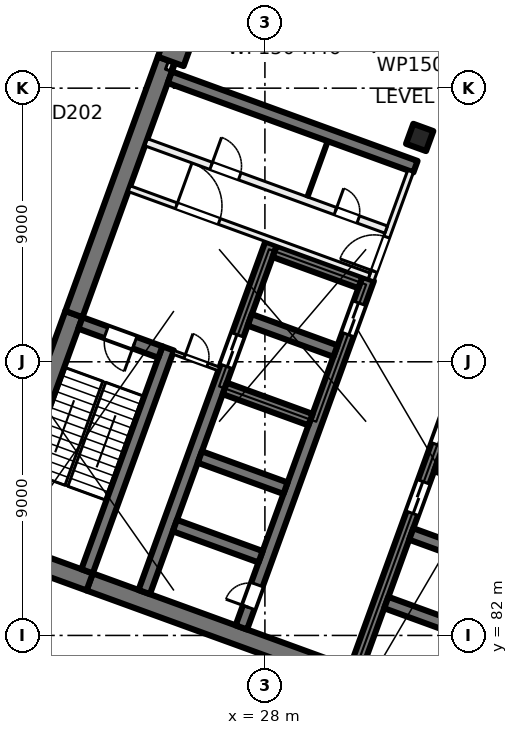
"""IFC4 building model, lengths in metres.
Left out: names, types, materials, properties, quantities, classifications, styles, units other than length and angle.
Written with IfcOpenShell. Run it as: python <this file> out.ifc"""

import sys

from ifc_helpers import new_model, si_unit, direction, frame, frame_2d, origin, origin_2d, place, context, subcontext, project, spatial, rectangle, extrude, element, fill, save


model = new_model("IFC4")
c1 = context("Model", 3, precision=1e-05, world=origin(), true_north=direction((0.0, 1.0)))
c2 = subcontext(c1, "Body", "Model", "MODEL_VIEW")
j1 = project(units=[si_unit("LENGTHUNIT", "METRE"), si_unit("PLANEANGLEUNIT", "RADIAN")], contexts=[c1])
p1 = place(None, origin())
s1 = spatial("IfcSite", under=j1, at=p1, CompositionType="ELEMENT")
p2 = place(p1, origin())
s2 = spatial("IfcBuilding", under=s1, at=p2, CompositionType="ELEMENT")
p3 = place(p2, frame((0.0, 0.0, 7.5)))
s3 = spatial("IfcBuildingStorey", under=s2, at=p3, CompositionType="ELEMENT", Elevation=7.5)
p4 = place(p3, frame((33.091, 98.379, 0.0), z_axis=(0.0, 0.0, 1.0), x_axis=(-0.342020143326, -0.939692620786, 0.0)))
e1 = element("IfcColumn", 1, at=p4, inside=s3, PredefinedType="COLUMN", context=c2, shape_type="SweptSolid", body=[
    extrude(rectangle(XDim=0.7, YDim=0.7, at=origin_2d()), origin(), (0.0, 0.0, 1.0), 5.0),
])
p5 = place(p3, frame((25.056, 101.303, 0.0), z_axis=(0.0, 0.0, 1.0), x_axis=(-0.342020143326, -0.939692620786, 0.0)))
e2 = element("IfcColumn", 2, at=p5, inside=s3, PredefinedType="COLUMN", context=c2, shape_type="SweptSolid", body=[
    extrude(rectangle(XDim=0.9, YDim=0.9, at=origin_2d()), origin(), (0.0, 0.0, 1.0), 5.0),
])
p6 = place(p3, frame((35.767, 78.835, 0.0), z_axis=(0.0, 0.0, 1.0), x_axis=(-0.939692894512, 0.342019391267, 0.0)))
e3 = element("IfcWall", 3, at=p6, inside=s3, PredefinedType="SHEAR", context=c2, shape_type="SweptSolid", body=[
    extrude(rectangle(XDim=14.4, YDim=0.6, at=frame_2d((7.2, 0.0))), origin(), (0.0, 0.0, 1.0), 5.0),
])
p7 = place(p3, frame((22.236, 83.76, 0.0), z_axis=(0.0, 0.0, 1.0), x_axis=(-0.939680822529, 0.342052557032, 0.0)))
e4 = element("IfcWall", 4, at=p7, inside=s3, PredefinedType="SHEAR", context=c2, shape_type="SweptSolid", body=[
    extrude(rectangle(XDim=3.8, YDim=0.6, at=frame_2d((1.9, 0.0))), origin(), (0.0, 0.0, 1.0), 5.0),
])
p8 = place(p3, frame((19.05, 85.239, 0.0), z_axis=(0.0, 0.0, 1.0), x_axis=(0.342016982193, 0.939693771338, 0.0)))
e5 = element("IfcWall", 5, at=p8, inside=s3, PredefinedType="SHEAR", context=c2, shape_type="SweptSolid", body=[
    extrude(rectangle(XDim=7.8, YDim=0.6, at=frame_2d((3.9, 0.0))), origin(), (0.0, 0.0, 1.0), 5.0),
])
p9 = place(p3, frame((21.717, 92.568, 0.0), z_axis=(0.0, 0.0, 1.0), x_axis=(0.342016162452, 0.939694069696, 0.0)))
e6 = element("IfcWall", 6, at=p9, inside=s3, PredefinedType="SHEAR", context=c2, shape_type="SweptSolid", body=[
    extrude(rectangle(XDim=8.9, YDim=0.6, at=frame_2d((4.45, 0.0))), origin(), (0.0, 0.0, 1.0), 5.0),
])
p10 = place(p3, frame((22.15, 84.11, 0.0), z_axis=(0.0, 0.0, 1.0), x_axis=(0.342016982193, 0.939693771338, 0.0)))
e7 = element("IfcWall", 7, at=p10, inside=s3, PredefinedType="SHEAR", context=c2, shape_type="SweptSolid", body=[
    extrude(rectangle(XDim=7.8, YDim=0.4, at=frame_2d((3.9, 0.0))), origin(), (0.0, 0.0, 1.0), 5.0),
])
p11 = place(p3, frame((24.562, 91.32, 0.0), z_axis=(0.0, 0.0, 1.0), x_axis=(-0.939717030584, 0.341953070509, 0.0)))
e8 = element("IfcWall", 8, at=p11, inside=s3, PredefinedType="SHEAR", context=c2, shape_type="SweptSolid", body=[
    extrude(rectangle(XDim=2.8, YDim=0.4, at=frame_2d((1.4, 0.0))), origin(), (0.0, 0.0, 1.0), 5.0),
])
p12 = place(p11, frame((0.9, 0.0, 0.0)))
e9 = element("IfcOpeningElement", 9, at=p12, cuts=e8, PredefinedType="OPENING", context=c2, shape_type="SweptSolid", body=[
    extrude(rectangle(XDim=1.0, YDim=2.1, at=frame_2d((0.5, 1.05))), frame((0.0, 0.21, 0.0), z_axis=(0.0, -1.0, 0.0), x_axis=(1.0, 0.0, 0.0)), (0.0, 0.0, 1.0), 0.42),
])
p13 = place(p3, frame((30.984, 80.895, 0.0), z_axis=(0.0, 0.0, 1.0), x_axis=(0.342021021735, 0.939692301071, 0.0)))
e10 = element("IfcWall", 10, at=p13, inside=s3, PredefinedType="SHEAR", context=c2, shape_type="SweptSolid", body=[
    extrude(rectangle(XDim=12.2, YDim=0.4, at=frame_2d((6.1, 0.0))), origin(), (0.0, 0.0, 1.0), 5.0),
])
p14 = place(p13, frame((5.45, 0.0, 0.0)))
e11 = element("IfcOpeningElement", 11, at=p14, cuts=e10, PredefinedType="OPENING", context=c2, shape_type="SweptSolid", body=[
    extrude(rectangle(XDim=1.1, YDim=2.1, at=frame_2d((0.55, 1.05))), frame((0.0, 0.21, 0.0), z_axis=(0.0, -1.0, 0.0), x_axis=(1.0, 0.0, 0.0)), (0.0, 0.0, 1.0), 0.42),
])
p15 = place(p13, frame((7.85, 0.0, 0.0)))
e12 = element("IfcOpeningElement", 12, at=p15, cuts=e10, PredefinedType="OPENING", context=c2, shape_type="SweptSolid", body=[
    extrude(rectangle(XDim=1.1, YDim=2.1, at=frame_2d((0.55, 1.05))), frame((0.0, 0.21, 0.0), z_axis=(0.0, -1.0, 0.0), x_axis=(1.0, 0.0, 0.0)), (0.0, 0.0, 1.0), 0.42),
])
p16 = place(p13, frame((10.25, 0.0, 0.0)))
e13 = element("IfcOpeningElement", 13, at=p16, cuts=e10, PredefinedType="OPENING", context=c2, shape_type="SweptSolid", body=[
    extrude(rectangle(XDim=1.1, YDim=2.1, at=frame_2d((0.55, 1.05))), frame((0.0, 0.21, 0.0), z_axis=(0.0, -1.0, 0.0), x_axis=(1.0, 0.0, 0.0)), (0.0, 0.0, 1.0), 0.42),
])
for number, where, z_axis, x_axis in (
    (14, (34.812, 82.056, 0.0), (0.0, 0.0, 1.0), (-0.94, 0.342, 0.0)),
    (15, (35.632, 84.311, 0.0), (0.0, 0.0, 1.0), (-0.94, 0.342, 0.0)),
    (16, (36.453, 86.566, 0.0), (0.0, 0.0, 1.0), (-0.94, 0.342, 0.0)),
):
    element("IfcWall", number, at=place(p3, frame(where, z_axis=z_axis, x_axis=x_axis)), inside=s3, PredefinedType="SHEAR", context=c2, shape_type="SweptSolid", body=[
        extrude(rectangle(XDim=3.0, YDim=0.4, at=frame_2d((1.5, 0.0))), origin(), (0.0, 0.0, 1.0), 5.0),
    ])
p17 = place(p3, frame((27.225, 82.263, 0.0), z_axis=(0.0, 0.0, 1.0), x_axis=(0.342014590177, 0.939694641948, 0.0)))
e17 = element("IfcWall", 17, at=p17, inside=s3, PredefinedType="SHEAR", context=c2, shape_type="SweptSolid", body=[
    extrude(rectangle(XDim=12.2, YDim=0.4, at=frame_2d((6.1, 0.0))), origin(), (0.0, 0.0, 1.0), 5.0),
])
p18 = place(p17, frame((10.25, 0.0, 0.0)))
e18 = element("IfcOpeningElement", 18, at=p18, cuts=e17, PredefinedType="OPENING", context=c2, shape_type="SweptSolid", body=[
    extrude(rectangle(XDim=1.1, YDim=2.1, at=frame_2d((0.55, 1.05))), frame((0.0, 0.21, 0.0), z_axis=(0.0, -1.0, 0.0), x_axis=(1.0, 0.0, 0.0)), (0.0, 0.0, 1.0), 0.42),
])
p19 = place(p17, frame((0.7, 0.0, 0.0)))
e19 = element("IfcOpeningElement", 19, at=p19, cuts=e17, PredefinedType="OPENING", context=c2, shape_type="SweptSolid", body=[
    extrude(rectangle(XDim=0.8, YDim=2.1, at=frame_2d((0.4, 1.05))), frame((0.0, 0.21, 0.0), z_axis=(0.0, -1.0, 0.0), x_axis=(1.0, 0.0, 0.0)), (0.0, 0.0, 1.0), 0.42),
])
p20 = place(p3, frame((24.03, 83.426, 0.0), z_axis=(0.0, 0.0, 1.0), x_axis=(0.342014590177, 0.939694641948, 0.0)))
e20 = element("IfcWall", 20, at=p20, inside=s3, PredefinedType="SHEAR", context=c2, shape_type="SweptSolid", body=[
    extrude(rectangle(XDim=12.2, YDim=0.4, at=frame_2d((6.1, 0.0))), origin(), (0.0, 0.0, 1.0), 5.0),
])
p21 = place(p20, frame((7.9, 0.0, 0.0)))
e21 = element("IfcOpeningElement", 21, at=p21, cuts=e20, PredefinedType="OPENING", context=c2, shape_type="SweptSolid", body=[
    extrude(rectangle(XDim=1.1, YDim=2.1, at=frame_2d((0.55, 1.05))), frame((0.0, 0.21, 0.0), z_axis=(0.0, -1.0, 0.0), x_axis=(1.0, 0.0, 0.0)), (0.0, 0.0, 1.0), 0.42),
])
p22 = place(p3, frame((27.858, 84.587, 0.0), z_axis=(0.0, 0.0, 1.0), x_axis=(-0.939686455819, 0.342037080957, 0.0)))
e22 = element("IfcWall", 22, at=p22, inside=s3, PredefinedType="SHEAR", context=c2, shape_type="SweptSolid", body=[
    extrude(rectangle(XDim=3.0, YDim=0.4, at=frame_2d((1.5, 0.0))), origin(), (0.0, 0.0, 1.0), 5.0),
])
p23 = place(p3, frame((28.678, 86.842, 0.0), z_axis=(0.0, 0.0, 1.0), x_axis=(-0.939676934218, 0.342063238742, 0.0)))
e23 = element("IfcWall", 23, at=p23, inside=s3, PredefinedType="SHEAR", context=c2, shape_type="SweptSolid", body=[
    extrude(rectangle(XDim=3.0, YDim=0.4, at=frame_2d((1.5, 0.0))), origin(), (0.0, 0.0, 1.0), 5.0),
])
for number, where, z_axis, x_axis in (
    (24, (29.5, 89.097, 0.0), (0.0, 0.0, 1.0), (-0.94, 0.342, 0.0)),
    (25, (30.32, 91.353, 0.0), (0.0, 0.0, 1.0), (-0.94, 0.342, 0.0)),
    (26, (31.141, 93.608, 0.0), (0.0, 0.0, 1.0), (-0.94, 0.342, 0.0)),
):
    element("IfcWall", number, at=place(p3, frame(where, z_axis=z_axis, x_axis=x_axis)), inside=s3, PredefinedType="SHEAR", context=c2, shape_type="SweptSolid", body=[
        extrude(rectangle(XDim=3.0, YDim=0.4, at=frame_2d((1.5, 0.0))), origin(), (0.0, 0.0, 1.0), 5.0),
    ])
p24 = place(p3, frame((32.953, 97.418, 0.0), z_axis=(0.0, 0.0, 1.0), x_axis=(-0.93969060187, 0.342025690201, 0.0)))
e27 = element("IfcWall", 27, at=p24, inside=s3, PredefinedType="SHEAR", context=c2, shape_type="SweptSolid", body=[
    extrude(rectangle(XDim=8.6, YDim=0.4, at=frame_2d((4.3, 0.0))), origin(), (0.0, 0.0, 1.0), 5.0),
])
p25 = place(p3, frame((12.199, 89.809, 0.0), z_axis=(0.0, 0.0, 1.0), x_axis=(0.342022998908, 0.939691581434, 0.0)))
e28 = element("IfcWall", 28, at=p25, inside=s3, PredefinedType="SOLIDWALL", context=c2, shape_type="SweptSolid", body=[
    extrude(rectangle(XDim=47.334, YDim=0.6, at=frame_2d((23.667, 0.0))), origin(), (0.0, 0.0, 1.0), 4.6),
])
p26 = place(p25, frame((0.773, 0.0, 0.9)))
e29 = element("IfcOpeningElement", 29, at=p26, cuts=e28, PredefinedType="OPENING", context=c2, shape_type="SweptSolid", body=[
    extrude(rectangle(XDim=3.0, YDim=3.0, at=frame_2d((1.5, 1.5))), frame((0.0, 0.31, 0.0), z_axis=(0.0, -1.0, 0.0), x_axis=(1.0, 0.0, 0.0)), (0.0, 0.0, 1.0), 0.62),
])
p27 = place(p25, frame((5.379, 0.0, 0.9)))
e30 = element("IfcOpeningElement", 30, at=p27, cuts=e28, PredefinedType="OPENING", context=c2, shape_type="SweptSolid", body=[
    extrude(rectangle(XDim=3.0, YDim=3.0, at=frame_2d((1.5, 1.5))), frame((0.0, 0.31, 0.0), z_axis=(0.0, -1.0, 0.0), x_axis=(1.0, 0.0, 0.0)), (0.0, 0.0, 1.0), 0.62),
])
p28 = place(p25, frame((9.235, 0.0, 0.9)))
e31 = element("IfcOpeningElement", 31, at=p28, cuts=e28, PredefinedType="OPENING", context=c2, shape_type="SweptSolid", body=[
    extrude(rectangle(XDim=3.0, YDim=3.0, at=frame_2d((1.5, 1.5))), frame((0.0, 0.31, 0.0), z_axis=(0.0, -1.0, 0.0), x_axis=(1.0, 0.0, 0.0)), (0.0, 0.0, 1.0), 0.62),
])
p29 = place(p25, frame((14.786, 0.0, 0.9)))
e32 = element("IfcOpeningElement", 32, at=p29, cuts=e28, PredefinedType="OPENING", context=c2, shape_type="SweptSolid", body=[
    extrude(rectangle(XDim=1.2, YDim=3.0, at=frame_2d((0.6, 1.5))), frame((0.0, 0.31, 0.0), z_axis=(0.0, -1.0, 0.0), x_axis=(1.0, 0.0, 0.0)), (0.0, 0.0, 1.0), 0.62),
])
p30 = place(p25, frame((16.286, 0.0, 0.9)))
e33 = element("IfcOpeningElement", 33, at=p30, cuts=e28, PredefinedType="OPENING", context=c2, shape_type="SweptSolid", body=[
    extrude(rectangle(XDim=1.2, YDim=3.0, at=frame_2d((0.6, 1.5))), frame((0.0, 0.31, 0.0), z_axis=(0.0, -1.0, 0.0), x_axis=(1.0, 0.0, 0.0)), (0.0, 0.0, 1.0), 0.62),
])
p31 = place(p25, frame((18.118, 0.0, 0.9)))
e34 = element("IfcOpeningElement", 34, at=p31, cuts=e28, PredefinedType="OPENING", context=c2, shape_type="SweptSolid", body=[
    extrude(rectangle(XDim=1.2, YDim=3.0, at=frame_2d((0.6, 1.5))), frame((0.0, 0.31, 0.0), z_axis=(0.0, -1.0, 0.0), x_axis=(1.0, 0.0, 0.0)), (0.0, 0.0, 1.0), 0.62),
])
p32 = place(p25, frame((19.618, 0.0, 0.9)))
e35 = element("IfcOpeningElement", 35, at=p32, cuts=e28, PredefinedType="OPENING", context=c2, shape_type="SweptSolid", body=[
    extrude(rectangle(XDim=1.2, YDim=3.0, at=frame_2d((0.6, 1.5))), frame((0.0, 0.31, 0.0), z_axis=(0.0, -1.0, 0.0), x_axis=(1.0, 0.0, 0.0)), (0.0, 0.0, 1.0), 0.62),
])
p33 = place(p25, frame((22.452, 0.0, 0.9)))
e36 = element("IfcOpeningElement", 36, at=p33, cuts=e28, PredefinedType="OPENING", context=c2, shape_type="SweptSolid", body=[
    extrude(rectangle(XDim=3.0, YDim=3.0, at=frame_2d((1.5, 1.5))), frame((0.0, 0.31, 0.0), z_axis=(0.0, -1.0, 0.0), x_axis=(1.0, 0.0, 0.0)), (0.0, 0.0, 1.0), 0.62),
])
p34 = place(p25, frame((26.458, 0.0, 0.9)))
e37 = element("IfcOpeningElement", 37, at=p34, cuts=e28, PredefinedType="OPENING", context=c2, shape_type="SweptSolid", body=[
    extrude(rectangle(XDim=3.0, YDim=3.0, at=frame_2d((1.5, 1.5))), frame((0.0, 0.31, 0.0), z_axis=(0.0, -1.0, 0.0), x_axis=(1.0, 0.0, 0.0)), (0.0, 0.0, 1.0), 0.62),
])
p35 = place(p25, frame((31.064, 0.0, 0.9)))
e38 = element("IfcOpeningElement", 38, at=p35, cuts=e28, PredefinedType="OPENING", context=c2, shape_type="SweptSolid", body=[
    extrude(rectangle(XDim=3.0, YDim=3.0, at=frame_2d((1.5, 1.5))), frame((0.0, 0.31, 0.0), z_axis=(0.0, -1.0, 0.0), x_axis=(1.0, 0.0, 0.0)), (0.0, 0.0, 1.0), 0.62),
])
p36 = place(p25, frame((36.029, 0.0, 0.9)))
e39 = element("IfcOpeningElement", 39, at=p36, cuts=e28, PredefinedType="OPENING", context=c2, shape_type="SweptSolid", body=[
    extrude(rectangle(XDim=1.2, YDim=3.0, at=frame_2d((0.6, 1.5))), frame((0.0, 0.31, 0.0), z_axis=(0.0, -1.0, 0.0), x_axis=(1.0, 0.0, 0.0)), (0.0, 0.0, 1.0), 0.62),
])
p37 = place(p25, frame((39.676, 0.0, 0.9)))
e40 = element("IfcOpeningElement", 40, at=p37, cuts=e28, PredefinedType="OPENING", context=c2, shape_type="SweptSolid", body=[
    extrude(rectangle(XDim=3.0, YDim=3.0, at=frame_2d((1.5, 1.5))), frame((0.0, 0.31, 0.0), z_axis=(0.0, -1.0, 0.0), x_axis=(1.0, 0.0, 0.0)), (0.0, 0.0, 1.0), 0.62),
])
p38 = place(p25, frame((43.531, 0.0, 0.9)))
e41 = element("IfcOpeningElement", 41, at=p38, cuts=e28, PredefinedType="OPENING", context=c2, shape_type="SweptSolid", body=[
    extrude(rectangle(XDim=3.0, YDim=3.0, at=frame_2d((1.5, 1.5))), frame((0.0, 0.31, 0.0), z_axis=(0.0, -1.0, 0.0), x_axis=(1.0, 0.0, 0.0)), (0.0, 0.0, 1.0), 0.62),
])
p39 = place(p3, frame((31.491, 93.693, 0.0), z_axis=(0.0, 0.0, 1.0), x_axis=(0.341995824804, 0.939701471648, 0.0)))
e42 = element("IfcWall", 42, at=p39, inside=s3, PredefinedType="PARTITIONING", context=c2, shape_type="SweptSolid", body=[
    extrude(rectangle(XDim=3.8, YDim=0.2, at=frame_2d((1.9, 0.0))), origin(), (0.0, 0.0, 1.0), 4.6),
])
p40 = place(p39, frame((0.3, 0.0, 0.0)))
e43 = element("IfcOpeningElement", 43, at=p40, cuts=e42, PredefinedType="OPENING", context=c2, shape_type="SweptSolid", body=[
    extrude(rectangle(XDim=1.2, YDim=2.1, at=frame_2d((0.6, 1.05))), frame((0.0, 0.11, 0.0), z_axis=(0.0, -1.0, 0.0), x_axis=(1.0, 0.0, 0.0)), (0.0, 0.0, 1.0), 0.22),
])
p41 = place(p3, frame((23.538, 96.694, 0.0), z_axis=(0.0, 0.0, 1.0), x_axis=(0.939691552312, -0.342023078919, 0.0)))
e44 = element("IfcWall", 44, at=p41, inside=s3, PredefinedType="PARTITIONING", context=c2, shape_type="SweptSolid", body=[
    extrude(rectangle(XDim=8.4, YDim=0.2, at=frame_2d((4.2, 0.0))), origin(), (0.0, 0.0, 1.0), 4.6),
])
p42 = place(p41, frame((1.65, 0.0, 0.0)))
e45 = element("IfcOpeningElement", 45, at=p42, cuts=e44, PredefinedType="OPENING", context=c2, shape_type="SweptSolid", body=[
    extrude(rectangle(XDim=1.5, YDim=2.1, at=frame_2d((0.75, 1.05))), frame((0.0, 0.11, 0.0), z_axis=(0.0, -1.0, 0.0), x_axis=(1.0, 0.0, 0.0)), (0.0, 0.0, 1.0), 0.22),
])
p43 = place(p3, frame((24.094, 98.221, 0.0), z_axis=(0.0, 0.0, 1.0), x_axis=(0.939691552312, -0.342023078919, 0.0)))
e46 = element("IfcWall", 46, at=p43, inside=s3, PredefinedType="PARTITIONING", context=c2, shape_type="SweptSolid", body=[
    extrude(rectangle(XDim=8.4, YDim=0.25, at=frame_2d((4.2, 0.0))), origin(), (0.0, 0.0, 1.0), 4.6),
])
p44 = place(p43, frame((6.625, 0.0, 0.0)))
e47 = element("IfcOpeningElement", 47, at=p44, cuts=e46, PredefinedType="OPENING", context=c2, shape_type="SweptSolid", body=[
    extrude(rectangle(XDim=0.8, YDim=2.1, at=frame_2d((0.4, 1.05))), frame((0.0, 0.135, 0.0), z_axis=(0.0, -1.0, 0.0), x_axis=(1.0, 0.0, 0.0)), (0.0, 0.0, 1.0), 0.27),
])
p45 = place(p43, frame((2.275, 0.0, 0.0)))
e48 = element("IfcOpeningElement", 48, at=p45, cuts=e46, PredefinedType="OPENING", context=c2, shape_type="SweptSolid", body=[
    extrude(rectangle(XDim=1.0, YDim=2.1, at=frame_2d((0.5, 1.05))), frame((0.0, 0.135, 0.0), z_axis=(0.0, -1.0, 0.0), x_axis=(1.0, 0.0, 0.0)), (0.0, 0.0, 1.0), 0.27),
])
p46 = place(p3, frame((24.985, 91.312, 0.0), z_axis=(0.0, 0.0, 1.0), x_axis=(0.939708740826, -0.341975850632, 0.0)))
e49 = element("IfcWall", 49, at=p46, inside=s3, PredefinedType="PARTITIONING", context=c2, shape_type="SweptSolid", body=[
    extrude(rectangle(XDim=1.6, YDim=0.125, at=frame_2d((0.8, 0.0))), origin(), (0.0, 0.0, 1.0), 4.6),
])
p47 = place(p46, frame((0.4, 0.0, 0.0)))
e50 = element("IfcOpeningElement", 50, at=p47, cuts=e49, PredefinedType="OPENING", context=c2, shape_type="SweptSolid", body=[
    extrude(rectangle(XDim=0.8, YDim=2.1, at=frame_2d((0.4, 1.05))), frame((0.0, 0.073, 0.0), z_axis=(0.0, -1.0, 0.0), x_axis=(1.0, 0.0, 0.0)), (0.0, 0.0, 1.0), 0.145),
])
p48 = place(p3, frame((29.399, 96.424, 0.0), z_axis=(0.0, 0.0, 1.0), x_axis=(0.341913947243, 0.939731266204, 0.0)))
e51 = element("IfcWall", 51, at=p48, inside=s3, PredefinedType="PARTITIONING", context=c2, shape_type="SweptSolid", body=[
    extrude(rectangle(XDim=1.95, YDim=0.1, at=frame_2d((0.975, 0.0))), origin(), (0.0, 0.0, 1.0), 4.6),
])
p49 = place(p3, frame((24.8, 100.598, 0.0), z_axis=(0.0, 0.0, 1.0), x_axis=(0.34194689438, 0.939719277989, 0.0)))
e52 = element("IfcWall", 52, at=p49, inside=s3, PredefinedType="PARTITIONING", context=c2, shape_type="SweptSolid", body=[
    extrude(rectangle(XDim=5.001, YDim=0.15, at=frame_2d((2.5, 0.0))), origin(), (0.0, 0.0, 1.0), 4.6),
])
p50 = place(p49, frame((1.6, 0.0, 0.0)))
e53 = element("IfcOpeningElement", 53, at=p50, cuts=e52, PredefinedType="OPENING", context=c2, shape_type="SweptSolid", body=[
    extrude(rectangle(XDim=1.8, YDim=2.1, at=frame_2d((0.9, 1.05))), frame((0.0, 0.085, 0.0), z_axis=(0.0, -1.0, 0.0), x_axis=(1.0, 0.0, 0.0)), (0.0, 0.0, 1.0), 0.17),
])
p51 = place(p18, origin())
e54 = element("IfcDoor", 54, at=p51, inside=s3, OperationType="DOUBLE_DOOR_SLIDING", PredefinedType="DOOR", context=c2, shape_type="SweptSolid", body=[
    extrude(rectangle(XDim=1.1, YDim=2.1, at=frame_2d((0.55, 1.05))), frame((0.0, 0.025, 0.0), z_axis=(0.0, -1.0, 0.0), x_axis=(1.0, 0.0, 0.0)), (0.0, 0.0, 1.0), 0.05),
])
fill(e18, e54)
p52 = place(p14, origin())
e55 = element("IfcDoor", 55, at=p52, inside=s3, OperationType="DOUBLE_DOOR_SLIDING", PredefinedType="DOOR", context=c2, shape_type="SweptSolid", body=[
    extrude(rectangle(XDim=1.1, YDim=2.1, at=frame_2d((0.55, 1.05))), frame((0.0, 0.025, 0.0), z_axis=(0.0, -1.0, 0.0), x_axis=(1.0, 0.0, 0.0)), (0.0, 0.0, 1.0), 0.05),
])
fill(e11, e55)
p53 = place(p15, origin())
e56 = element("IfcDoor", 56, at=p53, inside=s3, OperationType="DOUBLE_DOOR_SLIDING", PredefinedType="DOOR", context=c2, shape_type="SweptSolid", body=[
    extrude(rectangle(XDim=1.1, YDim=2.1, at=frame_2d((0.55, 1.05))), frame((0.0, 0.025, 0.0), z_axis=(0.0, -1.0, 0.0), x_axis=(1.0, 0.0, 0.0)), (0.0, 0.0, 1.0), 0.05),
])
fill(e12, e56)
p54 = place(p19, origin())
e57 = element("IfcDoor", 57, at=p54, inside=s3, OperationType="SINGLE_SWING_LEFT", PredefinedType="DOOR", context=c2, shape_type="SweptSolid", body=[
    extrude(rectangle(XDim=0.8, YDim=2.1, at=frame_2d((0.4, 1.05))), frame((0.0, 0.025, 0.0), z_axis=(0.0, -1.0, 0.0), x_axis=(1.0, 0.0, 0.0)), (0.0, 0.0, 1.0), 0.05),
])
fill(e19, e57)
p55 = place(p40, origin())
e58 = element("IfcDoor", 58, at=p55, inside=s3, OperationType="DOUBLE_DOOR_SINGLE_SWING", PredefinedType="DOOR", context=c2, shape_type="SweptSolid", body=[
    extrude(rectangle(XDim=1.2, YDim=2.1, at=frame_2d((0.6, 1.05))), frame((0.0, 0.025, 0.0), z_axis=(0.0, -1.0, 0.0), x_axis=(1.0, 0.0, 0.0)), (0.0, 0.0, 1.0), 0.05),
])
fill(e43, e58)
p56 = place(p42, origin())
e59 = element("IfcDoor", 59, at=p56, inside=s3, OperationType="DOUBLE_DOOR_SINGLE_SWING", PredefinedType="DOOR", context=c2, shape_type="SweptSolid", body=[
    extrude(rectangle(XDim=1.5, YDim=2.1, at=frame_2d((0.75, 1.05))), frame((0.0, 0.025, 0.0), z_axis=(0.0, -1.0, 0.0), x_axis=(1.0, 0.0, 0.0)), (0.0, 0.0, 1.0), 0.05),
])
fill(e45, e59)
p57 = place(p12, origin())
e60 = element("IfcDoor", 60, at=p57, inside=s3, OperationType="SINGLE_SWING_LEFT", PredefinedType="DOOR", context=c2, shape_type="SweptSolid", body=[
    extrude(rectangle(XDim=1.0, YDim=2.1, at=frame_2d((0.5, 1.05))), frame((0.0, 0.025, 0.0), z_axis=(0.0, -1.0, 0.0), x_axis=(1.0, 0.0, 0.0)), (0.0, 0.0, 1.0), 0.05),
])
fill(e9, e60)
p58 = place(p47, origin())
e61 = element("IfcDoor", 61, at=p58, inside=s3, OperationType="SINGLE_SWING_RIGHT", PredefinedType="DOOR", context=c2, shape_type="SweptSolid", body=[
    extrude(rectangle(XDim=0.8, YDim=2.1, at=frame_2d((0.4, 1.05))), frame((0.0, 0.025, 0.0), z_axis=(0.0, -1.0, 0.0), x_axis=(1.0, 0.0, 0.0)), (0.0, 0.0, 1.0), 0.05),
])
fill(e50, e61)
p59 = place(p44, origin())
e62 = element("IfcDoor", 62, at=p59, inside=s3, OperationType="SINGLE_SWING_LEFT", PredefinedType="DOOR", context=c2, shape_type="SweptSolid", body=[
    extrude(rectangle(XDim=0.8, YDim=2.1, at=frame_2d((0.4, 1.05))), frame((0.0, 0.025, 0.0), z_axis=(0.0, -1.0, 0.0), x_axis=(1.0, 0.0, 0.0)), (0.0, 0.0, 1.0), 0.05),
])
fill(e47, e62)
p60 = place(p45, origin())
e63 = element("IfcDoor", 63, at=p60, inside=s3, OperationType="SINGLE_SWING_RIGHT", PredefinedType="DOOR", context=c2, shape_type="SweptSolid", body=[
    extrude(rectangle(XDim=1.0, YDim=2.1, at=frame_2d((0.5, 1.05))), frame((0.0, 0.025, 0.0), z_axis=(0.0, -1.0, 0.0), x_axis=(1.0, 0.0, 0.0)), (0.0, 0.0, 1.0), 0.05),
])
fill(e48, e63)
p61 = place(p21, origin())
e64 = element("IfcDoor", 64, at=p61, inside=s3, OperationType="DOUBLE_DOOR_SLIDING", PredefinedType="DOOR", context=c2, shape_type="SweptSolid", body=[
    extrude(rectangle(XDim=1.1, YDim=2.1, at=frame_2d((0.55, 1.05))), frame((0.0, 0.025, 0.0), z_axis=(0.0, -1.0, 0.0), x_axis=(1.0, 0.0, 0.0)), (0.0, 0.0, 1.0), 0.05),
])
fill(e21, e64)
save(model, sys.argv[1])
